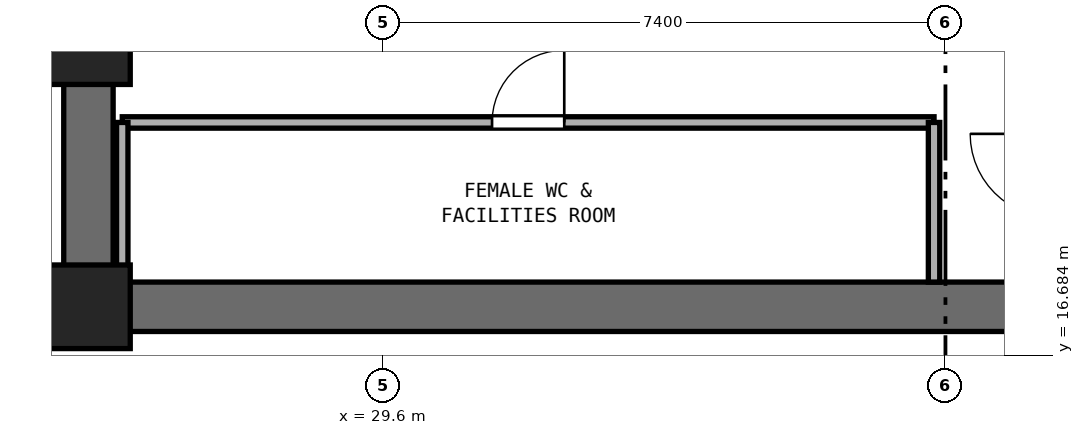
"""IFC4 building model, lengths in metres.
Left out: names, types, materials, properties, quantities, classifications, styles, units other than length and angle.
Written with IfcOpenShell. Run it as: python <this file> out.ifc"""

import sys

from ifc_helpers import new_model, si_unit, direction, frame, frame_2d, origin, origin_2d, place, context, subcontext, project, spatial, rectangle, extrude, element, fill, save


model = new_model("IFC4")
c1 = context("Model", 3, precision=1e-05, world=origin(), true_north=direction((0.0, 1.0)))
c2 = subcontext(c1, "Body", "Model", "MODEL_VIEW")
j1 = project(units=[si_unit("LENGTHUNIT", "METRE"), si_unit("PLANEANGLEUNIT", "RADIAN")], contexts=[c1])
p1 = place(None, origin())
s1 = spatial("IfcSite", under=j1, at=p1, CompositionType="ELEMENT")
p2 = place(p1, origin())
s2 = spatial("IfcBuilding", under=s1, at=p2, CompositionType="ELEMENT")
p3 = place(p2, frame((0.0, 0.0, 93.4)))
s3 = spatial("IfcBuildingStorey", under=s2, at=p3, CompositionType="ELEMENT", Elevation=93.4)
p4 = place(p3, frame((25.4, 17.325, 0.0), z_axis=(0.0, 0.0, 1.0), x_axis=(1.0, 0.0, 0.0)))
e1 = element("IfcWall", 1, at=p4, inside=s3, PredefinedType="SHEAR", context=c2, shape_type="SweptSolid", body=[
    extrude(rectangle(XDim=23.2, YDim=0.65, at=frame_2d((11.6, 0.0))), origin(), (0.0, 0.0, 1.0), 3.525),
])
p5 = place(p3, frame((25.725, 17.65, 0.0), z_axis=(0.0, 0.0, 1.0), x_axis=(0.0, 1.0, 0.0)))
e2 = element("IfcWall", 2, at=p5, inside=s3, PredefinedType="SHEAR", context=c2, shape_type="SweptSolid", body=[
    extrude(rectangle(XDim=15.1, YDim=0.65, at=frame_2d((7.55, 0.0))), origin(), (0.0, 0.0, 1.0), 3.525),
])
p6 = place(p5, frame((6.8, 0.0, 0.0)))
e3 = element("IfcOpeningElement", 3, at=p6, cuts=e2, PredefinedType="OPENING", context=c2, shape_type="SweptSolid", body=[
    extrude(rectangle(XDim=1.5, YDim=2.15, at=frame_2d((0.75, 1.075))), frame((0.0, 0.335, 0.0), z_axis=(0.0, -1.0, 0.0), x_axis=(1.0, 0.0, 0.0)), (0.0, 0.0, 1.0), 0.67),
])
for number, where, z_axis, x_axis in (
    (4, (25.725, 17.325, 0.0), (0.0, 0.0, 1.0), (1.0, 0.0, 0.0)),
    (5, (25.725, 20.8, 0.0), (0.0, 0.0, 1.0), (1.0, 0.0, 0.0)),
):
    element("IfcColumn", number, at=place(p3, frame(where, z_axis=z_axis, x_axis=x_axis)), inside=s3, PredefinedType="PILASTER", context=c2, shape_type="SweptSolid", body=[
        extrude(rectangle(XDim=1.1, YDim=1.1, at=origin_2d()), origin(), (0.0, 0.0, 1.0), 3.8),
    ])
p7 = place(p3, frame((26.17, 19.75, 0.0), z_axis=(0.0, 0.0, 1.0), x_axis=(1.0, 0.0, 0.0)))
e6 = element("IfcWall", 6, at=p7, inside=s3, PredefinedType="PARTITIONING", context=c2, shape_type="SweptSolid", body=[
    extrude(rectangle(XDim=10.68, YDim=0.15, at=frame_2d((5.34, 0.0))), origin(), (0.0, 0.0, 1.0), 3.525),
])
p8 = place(p7, frame((4.865, 0.0, 0.0)))
e7 = element("IfcOpeningElement", 7, at=p8, cuts=e6, PredefinedType="OPENING", context=c2, shape_type="SweptSolid", body=[
    extrude(rectangle(XDim=0.95, YDim=2.1, at=frame_2d((0.475, 1.05))), frame((0.0, 0.085, 0.0), z_axis=(0.0, -1.0, 0.0), x_axis=(1.0, 0.0, 0.0)), (0.0, 0.0, 1.0), 0.17),
])
for number, where, z_axis, x_axis in (
    (8, (26.17, 17.65, 0.0), (0.0, 0.0, 1.0), (0.0, 1.0, 0.0)),
    (9, (36.85, 17.65, 0.0), (0.0, 0.0, 1.0), (0.0, 1.0, 0.0)),
):
    element("IfcWall", number, at=place(p3, frame(where, z_axis=z_axis, x_axis=x_axis)), inside=s3, PredefinedType="PARTITIONING", context=c2, shape_type="SweptSolid", body=[
        extrude(rectangle(XDim=2.1, YDim=0.15, at=frame_2d((1.05, 0.0))), origin(), (0.0, 0.0, 1.0), 3.525),
    ])
p9 = place(p8, origin())
e10 = element("IfcDoor", 10, at=p9, inside=s3, OperationType="SINGLE_SWING_RIGHT", PredefinedType="DOOR", context=c2, shape_type="SweptSolid", body=[
    extrude(rectangle(XDim=0.95, YDim=2.1, at=frame_2d((0.475, 1.05))), frame((0.0, 0.025, 0.0), z_axis=(0.0, -1.0, 0.0), x_axis=(1.0, 0.0, 0.0)), (0.0, 0.0, 1.0), 0.05),
])
fill(e7, e10)
save(model, sys.argv[1])
